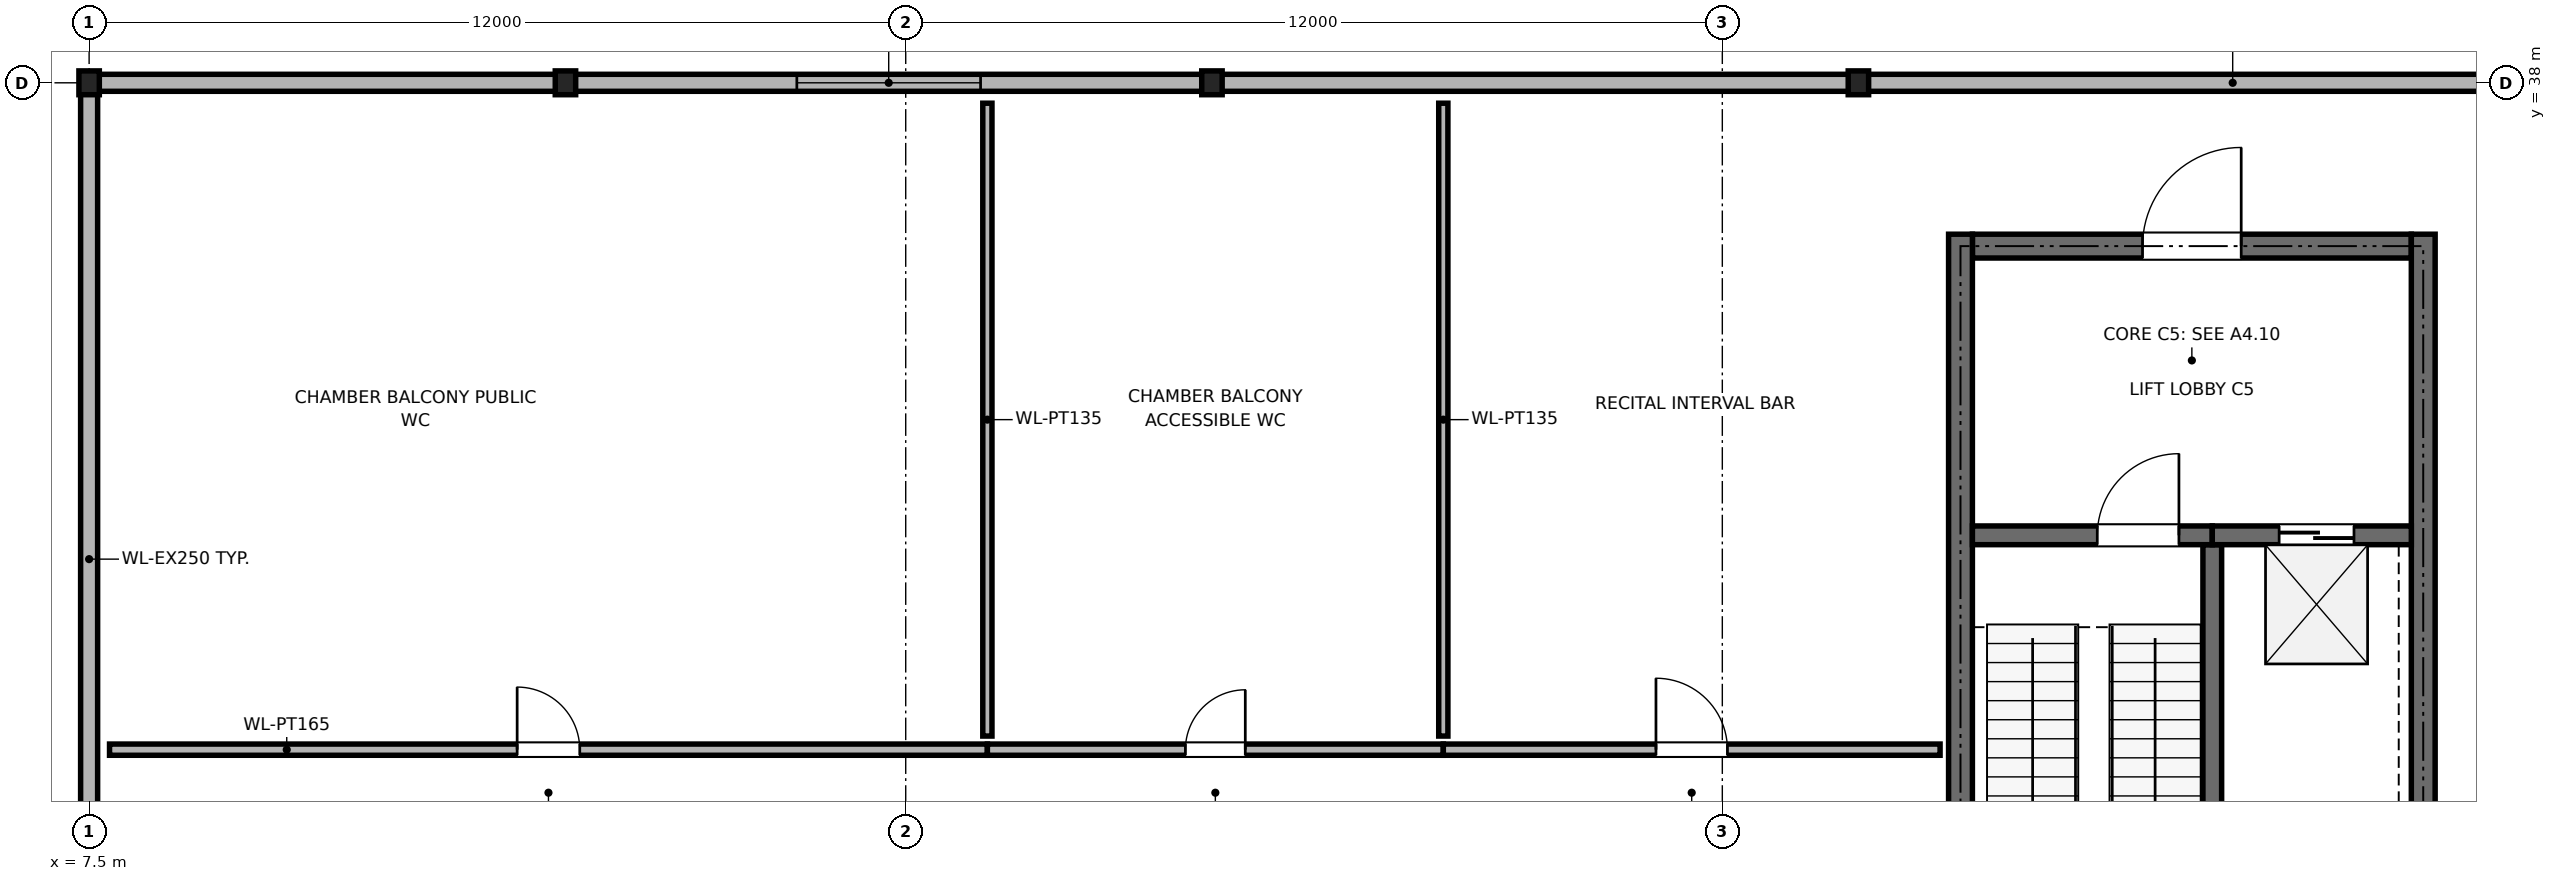
"""IFC4 building model, lengths in metres.
Left out: names, types, materials, properties, quantities, classifications, styles, units other than length and angle.
Written with IfcOpenShell. Run it as: python <this file> out.ifc"""

import sys

from ifc_helpers import new_model, si_unit, direction, frame, frame_2d, origin, origin_2d, place, context, subcontext, project, spatial, rectangle, i_section, extrude, element, fill, save


model = new_model("IFC4")
c1 = context("Model", 3, precision=1e-05, world=origin(), true_north=direction((0.0, 1.0)))
c2 = subcontext(c1, "Body", "Model", "MODEL_VIEW")
j1 = project(units=[si_unit("LENGTHUNIT", "METRE"), si_unit("PLANEANGLEUNIT", "RADIAN")], contexts=[c1])
p1 = place(None, origin())
s1 = spatial("IfcSite", under=j1, at=p1, CompositionType="ELEMENT")
p2 = place(p1, origin())
s2 = spatial("IfcBuilding", under=s1, at=p2, CompositionType="ELEMENT")
p3 = place(p2, frame((0.0, 0.0, 4.8)))
s3 = spatial("IfcBuildingStorey", under=s2, at=p3, CompositionType="ELEMENT", Elevation=4.8)
for number, where, z_axis, x_axis in (
    (1, (33.5, 38.0, 0.0), (0.0, 0.0, 1.0), (1.0, 0.0, 0.0)),
    (2, (24.0, 38.0, 0.0), (0.0, 0.0, 1.0), (1.0, 0.0, 0.0)),
    (3, (14.5, 38.0, 0.0), (0.0, 0.0, 1.0), (1.0, 0.0, 0.0)),
    (4, (7.5, 38.0, 0.0), (0.0, 0.0, 1.0), (1.0, 0.0, 0.0)),
):
    element("IfcColumn", number, at=place(p3, frame(where, z_axis=z_axis, x_axis=x_axis)), inside=s3, PredefinedType="COLUMN", context=c2, shape_type="SweptSolid", body=[
        extrude(i_section(OverallWidth=0.3, OverallDepth=0.35, WebThickness=0.01, FlangeThickness=0.018, FilletRadius=0.027, at=origin_2d()), origin(), (0.0, 0.0, 1.0), 4.8),
    ])
p4 = place(p3, frame((33.52, 38.0, 0.0), z_axis=(0.0, 0.0, 1.0), x_axis=(1.0, 0.0, 0.0)))
e5 = element("IfcWall", 5, at=p4, inside=s3, PredefinedType="SOLIDWALL", context=c2, shape_type="SweptSolid", body=[
    extrude(rectangle(XDim=10.96, YDim=0.25, at=frame_2d((5.48, 0.0))), origin(), (0.0, 0.0, 1.0), 4.078),
])
p5 = place(p3, frame((24.02, 38.0, 0.0), z_axis=(0.0, 0.0, 1.0), x_axis=(1.0, 0.0, 0.0)))
e6 = element("IfcWall", 6, at=p5, inside=s3, PredefinedType="SOLIDWALL", context=c2, shape_type="SweptSolid", body=[
    extrude(rectangle(XDim=9.46, YDim=0.25, at=frame_2d((4.73, 0.0))), origin(), (0.0, 0.0, 1.0), 4.078),
])
p6 = place(p3, frame((14.52, 38.0, 0.0), z_axis=(0.0, 0.0, 1.0), x_axis=(1.0, 0.0, 0.0)))
e7 = element("IfcWall", 7, at=p6, inside=s3, PredefinedType="SOLIDWALL", context=c2, shape_type="SweptSolid", body=[
    extrude(rectangle(XDim=9.46, YDim=0.25, at=frame_2d((4.73, 0.0))), origin(), (0.0, 0.0, 1.0), 4.078),
])
p7 = place(p6, frame((3.38, 0.0, 0.85)))
e8 = element("IfcOpeningElement", 8, at=p7, cuts=e7, PredefinedType="OPENING", context=c2, shape_type="SweptSolid", body=[
    extrude(rectangle(XDim=2.7, YDim=1.7, at=frame_2d((1.35, 0.85))), frame((0.0, 0.135, 0.0), z_axis=(0.0, -1.0, 0.0), x_axis=(1.0, 0.0, 0.0)), (0.0, 0.0, 1.0), 0.27),
])
p8 = place(p3, frame((7.52, 38.0, 0.0), z_axis=(0.0, 0.0, 1.0), x_axis=(1.0, 0.0, 0.0)))
e9 = element("IfcWall", 9, at=p8, inside=s3, PredefinedType="SOLIDWALL", context=c2, shape_type="SweptSolid", body=[
    extrude(rectangle(XDim=6.96, YDim=0.25, at=frame_2d((3.48, 0.0))), origin(), (0.0, 0.0, 1.0), 4.078),
])
p9 = place(p3, frame((7.5, 24.02, 0.0), z_axis=(0.0, 0.0, 1.0), x_axis=(0.0, 1.0, 0.0)))
e10 = element("IfcWall", 10, at=p9, inside=s3, PredefinedType="SOLIDWALL", context=c2, shape_type="SweptSolid", body=[
    extrude(rectangle(XDim=13.96, YDim=0.25, at=frame_2d((6.98, 0.0))), origin(), (0.0, 0.0, 1.0), 4.078),
])
p10 = place(p3, frame((35.175, 35.6, 0.0), z_axis=(0.0, 0.0, 1.0), x_axis=(1.0, 0.0, 0.0)))
e11 = element("IfcWall", 11, at=p10, inside=s3, PredefinedType="SHEAR", context=c2, shape_type="SweptSolid", body=[
    extrude(rectangle(XDim=6.45, YDim=0.35, at=frame_2d((3.225, 0.0))), origin(), (0.0, 0.0, 1.0), 4.54),
])
p11 = place(p10, frame((2.5, 0.0, 0.0)))
e12 = element("IfcOpeningElement", 12, at=p11, cuts=e11, PredefinedType="OPENING", context=c2, shape_type="SweptSolid", body=[
    extrude(rectangle(XDim=1.45, YDim=2.2, at=frame_2d((0.725, 1.1))), frame((0.0, 0.185, 0.0), z_axis=(0.0, -1.0, 0.0), x_axis=(1.0, 0.0, 0.0)), (0.0, 0.0, 1.0), 0.37),
])
for number, where, z_axis, x_axis in (
    (13, (35.0, 24.575, 0.0), (0.0, 0.0, 1.0), (0.0, 1.0, 0.0)),
    (14, (41.8, 24.575, 0.0), (0.0, 0.0, 1.0), (0.0, 1.0, 0.0)),
):
    element("IfcWall", number, at=place(p3, frame(where, z_axis=z_axis, x_axis=x_axis)), inside=s3, PredefinedType="SHEAR", context=c2, shape_type="SweptSolid", body=[
        extrude(rectangle(XDim=11.2, YDim=0.35, at=frame_2d((5.6, 0.0))), origin(), (0.0, 0.0, 1.0), 4.54),
    ])
p12 = place(p3, frame((38.7, 24.575, 0.0), z_axis=(0.0, 0.0, 1.0), x_axis=(0.0, 1.0, 0.0)))
e15 = element("IfcWall", 15, at=p12, inside=s3, PredefinedType="SHEAR", context=c2, shape_type="SweptSolid", body=[
    extrude(rectangle(XDim=6.637, YDim=0.275, at=frame_2d((3.319, 0.0))), origin(), (0.0, 0.0, 1.0), 4.54),
])
p13 = place(p3, frame((35.175, 31.35, 0.0), z_axis=(0.0, 0.0, 1.0), x_axis=(1.0, 0.0, 0.0)))
e16 = element("IfcWall", 16, at=p13, inside=s3, PredefinedType="SHEAR", context=c2, shape_type="SweptSolid", body=[
    extrude(rectangle(XDim=3.525, YDim=0.275, at=frame_2d((1.762, 0.0))), origin(), (0.0, 0.0, 1.0), 4.54),
])
p14 = place(p13, frame((1.835, 0.0, 0.0)))
e17 = element("IfcOpeningElement", 17, at=p14, cuts=e16, PredefinedType="OPENING", context=c2, shape_type="SweptSolid", body=[
    extrude(rectangle(XDim=1.2, YDim=2.15, at=frame_2d((0.6, 1.075))), frame((0.0, 0.147, 0.0), z_axis=(0.0, -1.0, 0.0), x_axis=(1.0, 0.0, 0.0)), (0.0, 0.0, 1.0), 0.295),
])
p15 = place(p3, frame((38.7, 31.35, 0.0), z_axis=(0.0, 0.0, 1.0), x_axis=(1.0, 0.0, 0.0)))
e18 = element("IfcWall", 18, at=p15, inside=s3, PredefinedType="SHEAR", context=c2, shape_type="SweptSolid", body=[
    extrude(rectangle(XDim=2.925, YDim=0.275, at=frame_2d((1.462, 0.0))), origin(), (0.0, 0.0, 1.0), 4.54),
])
p16 = place(p15, frame((0.982, 0.0, 0.0)))
e19 = element("IfcOpeningElement", 19, at=p16, cuts=e18, PredefinedType="OPENING", context=c2, shape_type="SweptSolid", body=[
    extrude(rectangle(XDim=1.1, YDim=2.15, at=frame_2d((0.55, 1.075))), frame((0.0, 0.147, 0.0), z_axis=(0.0, -1.0, 0.0), x_axis=(1.0, 0.0, 0.0)), (0.0, 0.0, 1.0), 0.295),
])
p17 = place(p3, frame((7.8, 28.2, 0.0), z_axis=(0.0, 0.0, 1.0), x_axis=(1.0, 0.0, 0.0)))
e20 = element("IfcWall", 20, at=p17, inside=s3, PredefinedType="PARTITIONING", context=c2, shape_type="SweptSolid", body=[
    extrude(rectangle(XDim=12.9, YDim=0.165, at=frame_2d((6.45, 0.0))), origin(), (0.0, 0.0, 1.0), 4.08),
])
p18 = place(p17, frame((5.99, 0.0, 0.0)))
e21 = element("IfcOpeningElement", 21, at=p18, cuts=e20, PredefinedType="OPENING", context=c2, shape_type="SweptSolid", body=[
    extrude(rectangle(XDim=0.92, YDim=2.1, at=frame_2d((0.46, 1.05))), frame((0.0, 0.093, 0.0), z_axis=(0.0, -1.0, 0.0), x_axis=(1.0, 0.0, 0.0)), (0.0, 0.0, 1.0), 0.185),
])
p19 = place(p3, frame((20.7, 28.2, 0.0), z_axis=(0.0, 0.0, 1.0), x_axis=(1.0, 0.0, 0.0)))
e22 = element("IfcWall", 22, at=p19, inside=s3, PredefinedType="PARTITIONING", context=c2, shape_type="SweptSolid", body=[
    extrude(rectangle(XDim=6.7, YDim=0.165, at=frame_2d((3.35, 0.0))), origin(), (0.0, 0.0, 1.0), 4.08),
])
p20 = place(p19, frame((2.91, 0.0, 0.0)))
e23 = element("IfcOpeningElement", 23, at=p20, cuts=e22, PredefinedType="OPENING", context=c2, shape_type="SweptSolid", body=[
    extrude(rectangle(XDim=0.88, YDim=2.1, at=frame_2d((0.44, 1.05))), frame((0.0, 0.093, 0.0), z_axis=(0.0, -1.0, 0.0), x_axis=(1.0, 0.0, 0.0)), (0.0, 0.0, 1.0), 0.185),
])
p21 = place(p3, frame((27.4, 28.2, 0.0), z_axis=(0.0, 0.0, 1.0), x_axis=(1.0, 0.0, 0.0)))
e24 = element("IfcWall", 24, at=p21, inside=s3, PredefinedType="PARTITIONING", context=c2, shape_type="SweptSolid", body=[
    extrude(rectangle(XDim=7.3, YDim=0.165, at=frame_2d((3.65, 0.0))), origin(), (0.0, 0.0, 1.0), 4.08),
])
p22 = place(p21, frame((3.125, 0.0, 0.0)))
e25 = element("IfcOpeningElement", 25, at=p22, cuts=e24, PredefinedType="OPENING", context=c2, shape_type="SweptSolid", body=[
    extrude(rectangle(XDim=1.05, YDim=2.15, at=frame_2d((0.525, 1.075))), frame((0.0, 0.093, 0.0), z_axis=(0.0, -1.0, 0.0), x_axis=(1.0, 0.0, 0.0)), (0.0, 0.0, 1.0), 0.185),
])
for number, where, z_axis, x_axis in (
    (26, (20.7, 28.4, 0.0), (0.0, 0.0, 1.0), (0.0, 1.0, 0.0)),
    (27, (27.4, 28.4, 0.0), (0.0, 0.0, 1.0), (0.0, 1.0, 0.0)),
):
    element("IfcWall", number, at=place(p3, frame(where, z_axis=z_axis, x_axis=x_axis)), inside=s3, PredefinedType="PARTITIONING", context=c2, shape_type="SweptSolid", body=[
        extrude(rectangle(XDim=9.3, YDim=0.135, at=frame_2d((4.65, 0.0))), origin(), (0.0, 0.0, 1.0), 4.29),
    ])
p23 = place(p7, origin())
e28 = element("IfcWindow", 28, at=p23, inside=s3, PartitioningType="SINGLE_PANEL", PredefinedType="WINDOW", context=c2, shape_type="SweptSolid", body=[
    extrude(rectangle(XDim=2.7, YDim=1.7, at=frame_2d((1.35, 0.85))), frame((0.0, 0.03, 0.0), z_axis=(0.0, -1.0, 0.0), x_axis=(1.0, 0.0, 0.0)), (0.0, 0.0, 1.0), 0.06),
])
fill(e8, e28)
p24 = place(p14, origin())
e29 = element("IfcDoor", 29, at=p24, inside=s3, OperationType="SINGLE_SWING_RIGHT", PredefinedType="DOOR", context=c2, shape_type="SweptSolid", body=[
    extrude(rectangle(XDim=1.2, YDim=2.15, at=frame_2d((0.6, 1.075))), frame((0.0, 0.025, 0.0), z_axis=(0.0, -1.0, 0.0), x_axis=(1.0, 0.0, 0.0)), (0.0, 0.0, 1.0), 0.05),
])
fill(e17, e29)
p25 = place(p16, origin())
e30 = element("IfcDoor", 30, at=p25, inside=s3, OperationType="DOUBLE_DOOR_SLIDING", PredefinedType="DOOR", context=c2, shape_type="SweptSolid", body=[
    extrude(rectangle(XDim=1.1, YDim=2.15, at=frame_2d((0.55, 1.075))), frame((0.0, 0.025, 0.0), z_axis=(0.0, -1.0, 0.0), x_axis=(1.0, 0.0, 0.0)), (0.0, 0.0, 1.0), 0.05),
])
fill(e19, e30)
p26 = place(p11, origin())
e31 = element("IfcDoor", 31, at=p26, inside=s3, OperationType="SINGLE_SWING_RIGHT", PredefinedType="DOOR", context=c2, shape_type="SweptSolid", body=[
    extrude(rectangle(XDim=1.45, YDim=2.2, at=frame_2d((0.725, 1.1))), frame((0.0, 0.025, 0.0), z_axis=(0.0, -1.0, 0.0), x_axis=(1.0, 0.0, 0.0)), (0.0, 0.0, 1.0), 0.05),
])
fill(e12, e31)
p27 = place(p18, origin())
e32 = element("IfcDoor", 32, at=p27, inside=s3, OperationType="SINGLE_SWING_LEFT", PredefinedType="DOOR", context=c2, shape_type="SweptSolid", body=[
    extrude(rectangle(XDim=0.92, YDim=2.1, at=frame_2d((0.46, 1.05))), frame((0.0, 0.025, 0.0), z_axis=(0.0, -1.0, 0.0), x_axis=(1.0, 0.0, 0.0)), (0.0, 0.0, 1.0), 0.05),
])
fill(e21, e32)
p28 = place(p20, origin())
e33 = element("IfcDoor", 33, at=p28, inside=s3, OperationType="SINGLE_SWING_RIGHT", PredefinedType="DOOR", context=c2, shape_type="SweptSolid", body=[
    extrude(rectangle(XDim=0.88, YDim=2.1, at=frame_2d((0.44, 1.05))), frame((0.0, 0.025, 0.0), z_axis=(0.0, -1.0, 0.0), x_axis=(1.0, 0.0, 0.0)), (0.0, 0.0, 1.0), 0.05),
])
fill(e23, e33)
p29 = place(p22, origin())
e34 = element("IfcDoor", 34, at=p29, inside=s3, OperationType="SINGLE_SWING_LEFT", PredefinedType="DOOR", context=c2, shape_type="SweptSolid", body=[
    extrude(rectangle(XDim=1.05, YDim=2.15, at=frame_2d((0.525, 1.075))), frame((0.0, 0.025, 0.0), z_axis=(0.0, -1.0, 0.0), x_axis=(1.0, 0.0, 0.0)), (0.0, 0.0, 1.0), 0.05),
])
fill(e25, e34)
save(model, sys.argv[1])
